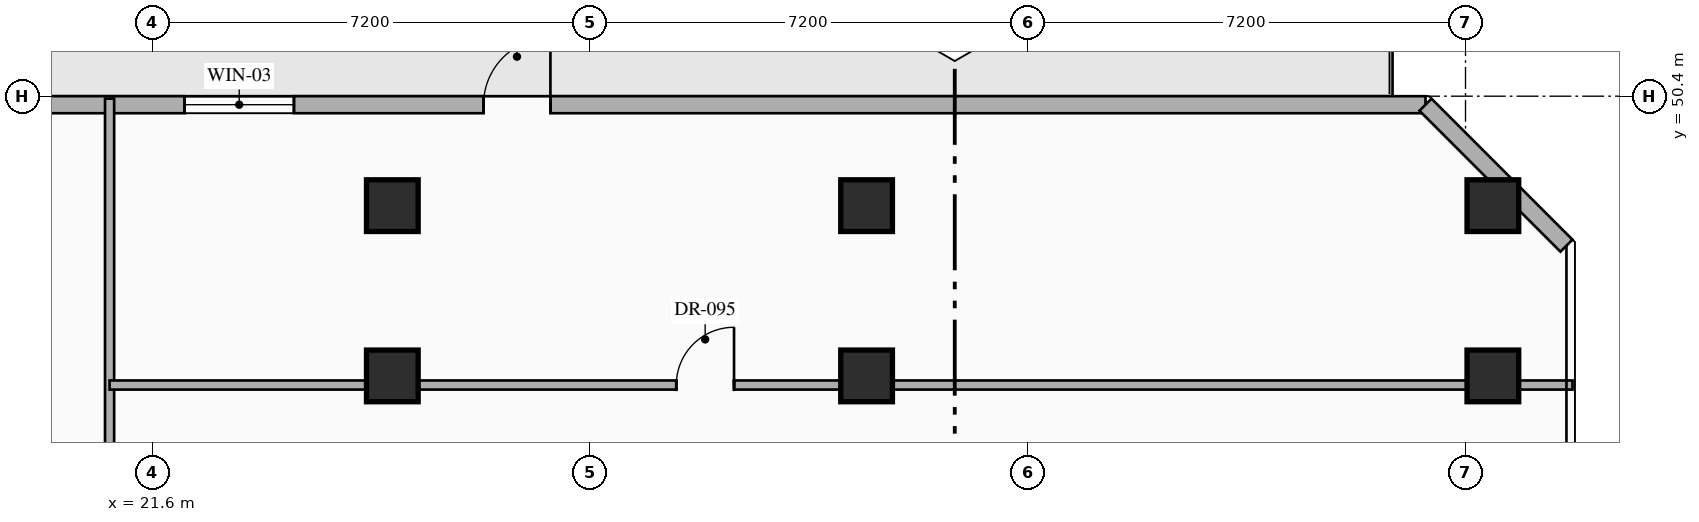
"""IFC4 building model, lengths in metres.
Left out: names, types, materials, properties, quantities, classifications, styles, units other than length and angle.
Written with IfcOpenShell. Run it as: python <this file> out.ifc"""

import sys

from ifc_helpers import new_model, si_unit, direction, frame, frame_2d, origin, origin_2d, place, context, subcontext, project, spatial, rectangle, hollow_rectangle, extrude, element, fill, save


model = new_model("IFC4")
c1 = context("Model", 3, precision=1e-05, world=origin(), true_north=direction((0.0, 1.0)))
c2 = subcontext(c1, "Body", "Model", "MODEL_VIEW")
j1 = project(units=[si_unit("LENGTHUNIT", "METRE"), si_unit("PLANEANGLEUNIT", "RADIAN")], contexts=[c1])
p1 = place(None, origin())
s1 = spatial("IfcSite", under=j1, at=p1, CompositionType="ELEMENT")
p2 = place(p1, origin())
s2 = spatial("IfcBuilding", under=s1, at=p2, CompositionType="ELEMENT")
p3 = place(p2, frame((0.0, 0.0, 134.85)))
s3 = spatial("IfcBuildingStorey", under=s2, at=p3, CompositionType="ELEMENT", Elevation=134.85)
for number, where, z_axis, x_axis in (
    (1, (25.55, 45.8, 0.0), (0.0, 0.0, 1.0), (1.0, 0.0, 0.0)),
    (2, (33.35, 45.8, 0.0), (0.0, 0.0, 1.0), (1.0, 0.0, 0.0)),
    (3, (43.65, 45.8, 0.0), (0.0, 0.0, 1.0), (1.0, 0.0, 0.0)),
    (4, (25.55, 48.6, 0.0), (0.0, 0.0, 1.0), (1.0, 0.0, 0.0)),
    (5, (33.35, 48.6, 0.0), (0.0, 0.0, 1.0), (1.0, 0.0, 0.0)),
    (6, (43.65, 48.6, 0.0), (0.0, 0.0, 1.0), (1.0, 0.0, 0.0)),
):
    element("IfcColumn", number, at=place(p3, frame(where, z_axis=z_axis, x_axis=x_axis)), inside=s3, PredefinedType="COLUMN", context=c2, shape_type="SweptSolid", body=[
        extrude(hollow_rectangle(XDim=0.85, YDim=0.85, WallThickness=0.032, at=origin_2d()), origin(), (0.0, 0.0, 1.0), 3.6),
    ])
p4 = place(p3, frame((12.058, 50.26, 0.0), z_axis=(0.0, 0.0, 1.0), x_axis=(1.0, 0.0, 0.0)))
e7 = element("IfcWall", 7, at=p4, inside=s3, PredefinedType="STANDARD", context=c2, shape_type="SweptSolid", body=[
    extrude(rectangle(XDim=30.484, YDim=0.28, at=frame_2d((15.242, 0.0))), origin(), (0.0, 0.0, 1.0), 3.35),
])
p5 = place(p4, frame((14.992, 0.0, 0.0)))
e8 = element("IfcOpeningElement", 8, at=p5, cuts=e7, PredefinedType="OPENING", context=c2, shape_type="SweptSolid", body=[
    extrude(rectangle(XDim=1.1, YDim=2.2, at=frame_2d((0.55, 1.1))), frame((0.0, 0.15, 0.0), z_axis=(0.0, -1.0, 0.0), x_axis=(1.0, 0.0, 0.0)), (0.0, 0.0, 1.0), 0.3),
])
p6 = place(p4, frame((10.074, 0.0, 0.85)))
e9 = element("IfcOpeningElement", 9, at=p6, cuts=e7, PredefinedType="OPENING", context=c2, shape_type="SweptSolid", body=[
    extrude(rectangle(XDim=1.8, YDim=2.1, at=frame_2d((0.9, 1.05))), frame((0.0, 0.15, 0.0), z_axis=(0.0, -1.0, 0.0), x_axis=(1.0, 0.0, 0.0)), (0.0, 0.0, 1.0), 0.3),
])
p7 = place(p3, frame((42.542, 50.26, 0.0), z_axis=(0.0, 0.0, 1.0), x_axis=(0.707106781187, -0.707106781187, 0.0)))
e10 = element("IfcWall", 10, at=p7, inside=s3, PredefinedType="STANDARD", context=c2, shape_type="SweptSolid", body=[
    extrude(rectangle(XDim=3.278, YDim=0.28, at=frame_2d((1.639, 0.0))), origin(), (0.0, 0.0, 1.0), 3.35),
])
p8 = place(p3, frame((20.9, 23.44, 0.0), z_axis=(0.0, 0.0, 1.0), x_axis=(0.0, 1.0, 0.0)))
e11 = element("IfcWall", 11, at=p8, inside=s3, PredefinedType="PARTITIONING", context=c2, shape_type="SweptSolid", body=[
    extrude(rectangle(XDim=26.92, YDim=0.15, at=frame_2d((13.46, 0.0))), origin(), (0.0, 0.0, 1.0), 3.35),
])
p9 = place(p8, frame((7.943, 0.0, 0.0)))
e12 = element("IfcOpeningElement", 12, at=p9, cuts=e11, PredefinedType="OPENING", context=c2, shape_type="SweptSolid", body=[
    extrude(rectangle(XDim=0.95, YDim=2.15, at=frame_2d((0.475, 1.075))), frame((0.0, 0.085, 0.0), z_axis=(0.0, -1.0, 0.0), x_axis=(1.0, 0.0, 0.0)), (0.0, 0.0, 1.0), 0.17),
])
p10 = place(p3, frame((20.9, 45.65, 0.0), z_axis=(0.0, 0.0, 1.0), x_axis=(1.0, 0.0, 0.0)))
e13 = element("IfcWall", 13, at=p10, inside=s3, PredefinedType="PARTITIONING", context=c2, shape_type="SweptSolid", body=[
    extrude(rectangle(XDim=24.06, YDim=0.15, at=frame_2d((12.03, 0.0))), origin(), (0.0, 0.0, 1.0), 2.695),
])
p11 = place(p10, frame((9.32, 0.0, 0.0)))
e14 = element("IfcOpeningElement", 14, at=p11, cuts=e13, PredefinedType="OPENING", context=c2, shape_type="SweptSolid", body=[
    extrude(rectangle(XDim=0.95, YDim=2.15, at=frame_2d((0.475, 1.075))), frame((0.0, 0.085, 0.0), z_axis=(0.0, -1.0, 0.0), x_axis=(1.0, 0.0, 0.0)), (0.0, 0.0, 1.0), 0.17),
])
p12 = place(p5, origin())
e15 = element("IfcDoor", 15, at=p12, inside=s3, OperationType="SINGLE_SWING_RIGHT", PredefinedType="DOOR", context=c2, shape_type="SweptSolid", body=[
    extrude(rectangle(XDim=1.1, YDim=2.2, at=frame_2d((0.55, 1.1))), frame((0.0, 0.025, 0.0), z_axis=(0.0, -1.0, 0.0), x_axis=(1.0, 0.0, 0.0)), (0.0, 0.0, 1.0), 0.05),
])
fill(e8, e15)
p13 = place(p6, origin())
e16 = element("IfcWindow", 16, at=p13, inside=s3, PartitioningType="SINGLE_PANEL", PredefinedType="WINDOW", context=c2, shape_type="SweptSolid", body=[
    extrude(rectangle(XDim=1.8, YDim=2.1, at=frame_2d((0.9, 1.05))), frame((0.0, 0.03, 0.0), z_axis=(0.0, -1.0, 0.0), x_axis=(1.0, 0.0, 0.0)), (0.0, 0.0, 1.0), 0.06),
])
fill(e9, e16)
p14 = place(p11, origin())
e17 = element("IfcDoor", 17, at=p14, inside=s3, OperationType="SINGLE_SWING_RIGHT", PredefinedType="DOOR", context=c2, shape_type="SweptSolid", body=[
    extrude(rectangle(XDim=0.95, YDim=2.15, at=frame_2d((0.475, 1.075))), frame((0.0, 0.025, 0.0), z_axis=(0.0, -1.0, 0.0), x_axis=(1.0, 0.0, 0.0)), (0.0, 0.0, 1.0), 0.05),
])
fill(e14, e17)
save(model, sys.argv[1])
